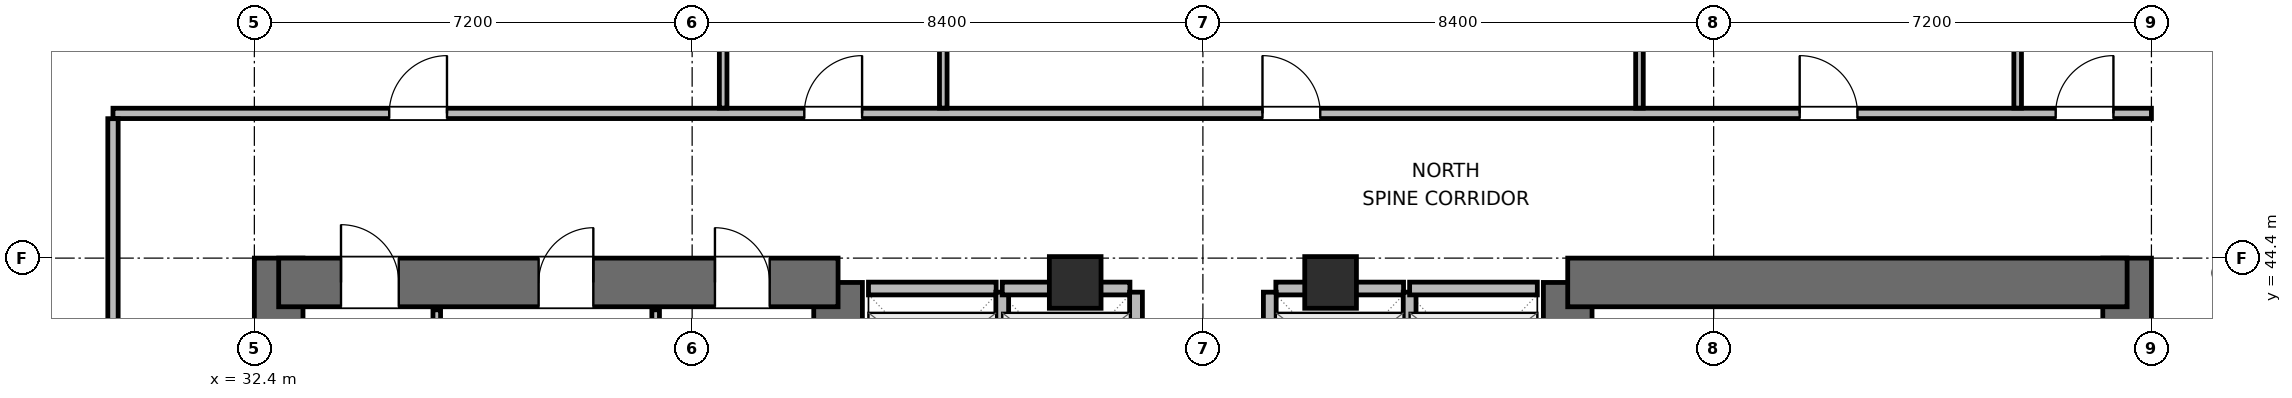
"""IFC4 building model, lengths in metres.
Left out: names, types, materials, properties, quantities, classifications, styles, units other than length and angle.
Written with IfcOpenShell. Run it as: python <this file> out.ifc"""

import sys

from ifc_helpers import new_model, si_unit, direction, frame, frame_2d, origin, origin_2d, place, context, subcontext, project, spatial, rectangle, extrude, element, fill, save


model = new_model("IFC4")
c1 = context("Model", 3, precision=1e-05, world=origin(), true_north=direction((0.0, 1.0)))
c2 = subcontext(c1, "Body", "Model", "MODEL_VIEW")
j1 = project(units=[si_unit("LENGTHUNIT", "METRE"), si_unit("PLANEANGLEUNIT", "RADIAN")], contexts=[c1])
p1 = place(None, origin())
s1 = spatial("IfcSite", under=j1, at=p1, CompositionType="ELEMENT")
p2 = place(p1, origin())
s2 = spatial("IfcBuilding", under=s1, at=p2, CompositionType="ELEMENT")
p3 = place(p2, frame((0.0, 0.0, 158.4)))
s3 = spatial("IfcBuildingStorey", under=s2, at=p3, CompositionType="ELEMENT", Elevation=158.4)
p4 = place(p3, frame((32.8, 27.6, 0.0), z_axis=(0.0, 0.0, 1.0), x_axis=(0.0, 1.0, 0.0)))
e1 = element("IfcWall", 1, at=p4, inside=s3, PredefinedType="SHEAR", context=c2, shape_type="SweptSolid", body=[
    extrude(rectangle(XDim=16.8, YDim=0.8, at=frame_2d((8.4, 0.0))), origin(), (0.0, 0.0, 1.0), 3.9),
])
p5 = place(p3, frame((42.0, 37.8, 0.0), z_axis=(0.0, 0.0, 1.0), x_axis=(0.0, 1.0, 0.0)))
e2 = element("IfcWall", 2, at=p5, inside=s3, PredefinedType="SHEAR", context=c2, shape_type="SweptSolid", body=[
    extrude(rectangle(XDim=6.2, YDim=0.8, at=frame_2d((3.1, 0.0))), origin(), (0.0, 0.0, 1.0), 3.9),
])
p6 = place(p3, frame((32.8, 44.0, 0.0), z_axis=(0.0, 0.0, 1.0), x_axis=(1.0, 0.0, 0.0)))
e3 = element("IfcWall", 3, at=p6, inside=s3, PredefinedType="SHEAR", context=c2, shape_type="SweptSolid", body=[
    extrude(rectangle(XDim=9.2, YDim=0.8, at=frame_2d((4.6, 0.0))), origin(), (0.0, 0.0, 1.0), 3.9),
])
p7 = place(p6, frame((1.025, 0.0, 0.0)))
e4 = element("IfcOpeningElement", 4, at=p7, cuts=e3, PredefinedType="OPENING", context=c2, shape_type="SweptSolid", body=[
    extrude(rectangle(XDim=0.95, YDim=2.04, at=frame_2d((0.475, 1.02))), frame((0.0, 0.41, 0.0), z_axis=(0.0, -1.0, 0.0), x_axis=(1.0, 0.0, 0.0)), (0.0, 0.0, 1.0), 0.82),
])
p8 = place(p6, frame((4.275, 0.0, 0.0)))
e5 = element("IfcOpeningElement", 5, at=p8, cuts=e3, PredefinedType="OPENING", context=c2, shape_type="SweptSolid", body=[
    extrude(rectangle(XDim=0.9, YDim=2.02, at=frame_2d((0.45, 1.01))), frame((0.0, 0.41, 0.0), z_axis=(0.0, -1.0, 0.0), x_axis=(1.0, 0.0, 0.0)), (0.0, 0.0, 1.0), 0.82),
])
p9 = place(p6, frame((7.175, 0.0, 0.0)))
e6 = element("IfcOpeningElement", 6, at=p9, cuts=e3, PredefinedType="OPENING", context=c2, shape_type="SweptSolid", body=[
    extrude(rectangle(XDim=0.9, YDim=2.02, at=frame_2d((0.45, 1.01))), frame((0.0, 0.41, 0.0), z_axis=(0.0, -1.0, 0.0), x_axis=(1.0, 0.0, 0.0)), (0.0, 0.0, 1.0), 0.82),
])
p10 = place(p3, frame((54.0, 38.0, 0.0), z_axis=(0.0, 0.0, 1.0), x_axis=(0.0, 1.0, 0.0)))
e7 = element("IfcWall", 7, at=p10, inside=s3, PredefinedType="SHEAR", context=c2, shape_type="SweptSolid", body=[
    extrude(rectangle(XDim=6.0, YDim=0.8, at=frame_2d((3.0, 0.0))), origin(), (0.0, 0.0, 1.0), 3.9),
])
p11 = place(p3, frame((63.2, 27.6, 0.0), z_axis=(0.0, 0.0, 1.0), x_axis=(0.0, 1.0, 0.0)))
e8 = element("IfcWall", 8, at=p11, inside=s3, PredefinedType="SHEAR", context=c2, shape_type="SweptSolid", body=[
    extrude(rectangle(XDim=16.8, YDim=0.8, at=frame_2d((8.4, 0.0))), origin(), (0.0, 0.0, 1.0), 3.9),
])
p12 = place(p3, frame((54.0, 44.0, 0.0), z_axis=(0.0, 0.0, 1.0), x_axis=(1.0, 0.0, 0.0)))
e9 = element("IfcWall", 9, at=p12, inside=s3, PredefinedType="SHEAR", context=c2, shape_type="SweptSolid", body=[
    extrude(rectangle(XDim=9.2, YDim=0.8, at=frame_2d((4.6, 0.0))), origin(), (0.0, 0.0, 1.0), 3.9),
])
for number, where, z_axis, x_axis in (
    (10, (45.9, 44.0, 0.0), (0.0, 0.0, 1.0), (1.0, 0.0, 0.0)),
    (11, (50.1, 44.0, 0.0), (0.0, 0.0, 1.0), (1.0, 0.0, 0.0)),
):
    element("IfcColumn", number, at=place(p3, frame(where, z_axis=z_axis, x_axis=x_axis)), inside=s3, PredefinedType="COLUMN", context=c2, shape_type="SweptSolid", body=[
        extrude(rectangle(XDim=0.85, YDim=0.85, at=origin_2d()), origin(), (0.0, 0.0, 1.0), 3.9),
    ])
for number, where, z_axis, x_axis in (
    (12, (35.4, 41.095, 0.0), (0.0, 0.0, 1.0), (0.0, 1.0, 0.0)),
    (13, (39.0, 41.095, 0.0), (0.0, 0.0, 1.0), (0.0, 1.0, 0.0)),
):
    element("IfcWall", number, at=place(p3, frame(where, z_axis=z_axis, x_axis=x_axis)), inside=s3, PredefinedType="PARTITIONING", context=c2, shape_type="SweptSolid", body=[
        extrude(rectangle(XDim=2.455, YDim=0.125, at=frame_2d((1.228, 0.0))), origin(), (0.0, 0.0, 1.0), 3.68),
    ])
p13 = place(p3, frame((42.5, 43.9, 0.0), z_axis=(0.0, 0.0, 1.0), x_axis=(1.0, 0.0, 0.0)))
e14 = element("IfcWall", 14, at=p13, inside=s3, PredefinedType="PARTITIONING", context=c2, shape_type="SweptSolid", body=[
    extrude(rectangle(XDim=2.1, YDim=0.21, at=frame_2d((1.05, 0.0))), origin(), (0.0, 0.0, 1.0), 2.565),
])
p14 = place(p3, frame((44.7, 41.56, 0.0), z_axis=(0.0, 0.0, 1.0), x_axis=(0.0, 1.0, 0.0)))
e15 = element("IfcWall", 15, at=p14, inside=s3, PredefinedType="PARTITIONING", context=c2, shape_type="SweptSolid", body=[
    extrude(rectangle(XDim=2.28, YDim=0.21, at=frame_2d((1.14, 0.0))), origin(), (0.0, 0.0, 1.0), 3.68),
])
p15 = place(p3, frame((44.7, 43.9, 0.0), z_axis=(0.0, 0.0, 1.0), x_axis=(1.0, 0.0, 0.0)))
e16 = element("IfcWall", 16, at=p15, inside=s3, PredefinedType="PARTITIONING", context=c2, shape_type="SweptSolid", body=[
    extrude(rectangle(XDim=2.1, YDim=0.21, at=frame_2d((1.05, 0.0))), origin(), (0.0, 0.0, 1.0), 2.565),
])
p16 = place(p3, frame((46.9, 41.56, 0.0), z_axis=(0.0, 0.0, 1.0), x_axis=(0.0, 1.0, 0.0)))
e17 = element("IfcWall", 17, at=p16, inside=s3, PredefinedType="PARTITIONING", context=c2, shape_type="SweptSolid", body=[
    extrude(rectangle(XDim=2.28, YDim=0.21, at=frame_2d((1.14, 0.0))), origin(), (0.0, 0.0, 1.0), 3.68),
])
p17 = place(p3, frame((49.2, 43.9, 0.0), z_axis=(0.0, 0.0, 1.0), x_axis=(1.0, 0.0, 0.0)))
e18 = element("IfcWall", 18, at=p17, inside=s3, PredefinedType="PARTITIONING", context=c2, shape_type="SweptSolid", body=[
    extrude(rectangle(XDim=2.1, YDim=0.21, at=frame_2d((1.05, 0.0))), origin(), (0.0, 0.0, 1.0), 2.565),
])
for number, where, z_axis, x_axis in (
    (19, (49.1, 41.56, 0.0), (0.0, 0.0, 1.0), (0.0, 1.0, 0.0)),
    (20, (51.4, 41.56, 0.0), (0.0, 0.0, 1.0), (0.0, 1.0, 0.0)),
):
    element("IfcWall", number, at=place(p3, frame(where, z_axis=z_axis, x_axis=x_axis)), inside=s3, PredefinedType="PARTITIONING", context=c2, shape_type="SweptSolid", body=[
        extrude(rectangle(XDim=2.28, YDim=0.21, at=frame_2d((1.14, 0.0))), origin(), (0.0, 0.0, 1.0), 3.68),
    ])
p18 = place(p3, frame((51.4, 43.9, 0.0), z_axis=(0.0, 0.0, 1.0), x_axis=(1.0, 0.0, 0.0)))
e21 = element("IfcWall", 21, at=p18, inside=s3, PredefinedType="PARTITIONING", context=c2, shape_type="SweptSolid", body=[
    extrude(rectangle(XDim=2.1, YDim=0.21, at=frame_2d((1.05, 0.0))), origin(), (0.0, 0.0, 1.0), 2.565),
])
p19 = place(p3, frame((30.075, 46.78, 0.0), z_axis=(0.0, 0.0, 1.0), x_axis=(1.0, 0.0, 0.0)))
e22 = element("IfcWall", 22, at=p19, inside=s3, PredefinedType="PARTITIONING", context=c2, shape_type="SweptSolid", body=[
    extrude(rectangle(XDim=33.525, YDim=0.17, at=frame_2d((16.763, 0.0))), origin(), (0.0, 0.0, 1.0), 3.68),
])
p20 = place(p19, frame((4.543, 0.0, 0.0)))
e23 = element("IfcOpeningElement", 23, at=p20, cuts=e22, PredefinedType="OPENING", context=c2, shape_type="SweptSolid", body=[
    extrude(rectangle(XDim=0.95, YDim=2.04, at=frame_2d((0.475, 1.02))), frame((0.0, 0.095, 0.0), z_axis=(0.0, -1.0, 0.0), x_axis=(1.0, 0.0, 0.0)), (0.0, 0.0, 1.0), 0.19),
])
p21 = place(p19, frame((11.37, 0.0, 0.0)))
e24 = element("IfcOpeningElement", 24, at=p21, cuts=e22, PredefinedType="OPENING", context=c2, shape_type="SweptSolid", body=[
    extrude(rectangle(XDim=0.95, YDim=2.04, at=frame_2d((0.475, 1.02))), frame((0.0, 0.095, 0.0), z_axis=(0.0, -1.0, 0.0), x_axis=(1.0, 0.0, 0.0)), (0.0, 0.0, 1.0), 0.19),
])
p22 = place(p19, frame((18.905, 0.0, 0.0)))
e25 = element("IfcOpeningElement", 25, at=p22, cuts=e22, PredefinedType="OPENING", context=c2, shape_type="SweptSolid", body=[
    extrude(rectangle(XDim=0.95, YDim=2.04, at=frame_2d((0.475, 1.02))), frame((0.0, 0.095, 0.0), z_axis=(0.0, -1.0, 0.0), x_axis=(1.0, 0.0, 0.0)), (0.0, 0.0, 1.0), 0.19),
])
p23 = place(p19, frame((27.74, 0.0, 0.0)))
e26 = element("IfcOpeningElement", 26, at=p23, cuts=e22, PredefinedType="OPENING", context=c2, shape_type="SweptSolid", body=[
    extrude(rectangle(XDim=0.95, YDim=2.04, at=frame_2d((0.475, 1.02))), frame((0.0, 0.095, 0.0), z_axis=(0.0, -1.0, 0.0), x_axis=(1.0, 0.0, 0.0)), (0.0, 0.0, 1.0), 0.19),
])
p24 = place(p19, frame((31.95, 0.0, 0.0)))
e27 = element("IfcOpeningElement", 27, at=p24, cuts=e22, PredefinedType="OPENING", context=c2, shape_type="SweptSolid", body=[
    extrude(rectangle(XDim=0.95, YDim=2.04, at=frame_2d((0.475, 1.02))), frame((0.0, 0.095, 0.0), z_axis=(0.0, -1.0, 0.0), x_axis=(1.0, 0.0, 0.0)), (0.0, 0.0, 1.0), 0.19),
])
p25 = place(p3, frame((30.075, 37.1, 0.0), z_axis=(0.0, 0.0, 1.0), x_axis=(0.0, 1.0, 0.0)))
e28 = element("IfcWall", 28, at=p25, inside=s3, PredefinedType="PARTITIONING", context=c2, shape_type="SweptSolid", body=[
    extrude(rectangle(XDim=9.593, YDim=0.17, at=frame_2d((4.796, 0.0))), origin(), (0.0, 0.0, 1.0), 3.68),
])
p26 = place(p25, frame((4.365, 0.0, 0.0)))
e29 = element("IfcOpeningElement", 29, at=p26, cuts=e28, PredefinedType="OPENING", context=c2, shape_type="SweptSolid", body=[
    extrude(rectangle(XDim=0.95, YDim=2.04, at=frame_2d((0.475, 1.02))), frame((0.0, 0.095, 0.0), z_axis=(0.0, -1.0, 0.0), x_axis=(1.0, 0.0, 0.0)), (0.0, 0.0, 1.0), 0.19),
])
p27 = place(p3, frame((40.11, 46.867, 0.0), z_axis=(0.0, 0.0, 1.0), x_axis=(0.0, 1.0, 0.0)))
e30 = element("IfcWall", 30, at=p27, inside=s3, PredefinedType="PARTITIONING", context=c2, shape_type="SweptSolid", body=[
    extrude(rectangle(XDim=15.298, YDim=0.125, at=frame_2d((7.649, 0.0))), origin(), (0.0, 0.0, 1.0), 3.043),
])
p28 = place(p3, frame((43.73, 46.867, 0.0), z_axis=(0.0, 0.0, 1.0), x_axis=(0.0, 1.0, 0.0)))
e31 = element("IfcWall", 31, at=p28, inside=s3, PredefinedType="PARTITIONING", context=c2, shape_type="SweptSolid", body=[
    extrude(rectangle(XDim=13.766, YDim=0.125, at=frame_2d((6.883, 0.0))), origin(), (0.0, 0.0, 1.0), 3.043),
])
p29 = place(p3, frame((55.18, 46.867, 0.0), z_axis=(0.0, 0.0, 1.0), x_axis=(0.0, 1.0, 0.0)))
e32 = element("IfcWall", 32, at=p29, inside=s3, PredefinedType="PARTITIONING", context=c2, shape_type="SweptSolid", body=[
    extrude(rectangle(XDim=15.258, YDim=0.125, at=frame_2d((7.629, 0.0))), origin(), (0.0, 0.0, 1.0), 3.043),
])
p30 = place(p3, frame((61.4, 46.867, 0.0), z_axis=(0.0, 0.0, 1.0), x_axis=(0.0, 1.0, 0.0)))
e33 = element("IfcWall", 33, at=p30, inside=s3, PredefinedType="PARTITIONING", context=c2, shape_type="SweptSolid", body=[
    extrude(rectangle(XDim=15.258, YDim=0.125, at=frame_2d((7.629, 0.0))), origin(), (0.0, 0.0, 1.0), 3.68),
])
p31 = place(p7, origin())
e34 = element("IfcDoor", 34, at=p31, inside=s3, OperationType="SINGLE_SWING_LEFT", PredefinedType="DOOR", context=c2, shape_type="SweptSolid", body=[
    extrude(rectangle(XDim=0.95, YDim=2.04, at=frame_2d((0.475, 1.02))), frame((0.0, 0.025, 0.0), z_axis=(0.0, -1.0, 0.0), x_axis=(1.0, 0.0, 0.0)), (0.0, 0.0, 1.0), 0.05),
])
fill(e4, e34)
p32 = place(p8, origin())
e35 = element("IfcDoor", 35, at=p32, inside=s3, OperationType="SINGLE_SWING_RIGHT", PredefinedType="DOOR", context=c2, shape_type="SweptSolid", body=[
    extrude(rectangle(XDim=0.9, YDim=2.02, at=frame_2d((0.45, 1.01))), frame((0.0, 0.025, 0.0), z_axis=(0.0, -1.0, 0.0), x_axis=(1.0, 0.0, 0.0)), (0.0, 0.0, 1.0), 0.05),
])
fill(e5, e35)
p33 = place(p9, origin())
e36 = element("IfcDoor", 36, at=p33, inside=s3, OperationType="SINGLE_SWING_LEFT", PredefinedType="DOOR", context=c2, shape_type="SweptSolid", body=[
    extrude(rectangle(XDim=0.9, YDim=2.02, at=frame_2d((0.45, 1.01))), frame((0.0, 0.025, 0.0), z_axis=(0.0, -1.0, 0.0), x_axis=(1.0, 0.0, 0.0)), (0.0, 0.0, 1.0), 0.05),
])
fill(e6, e36)
p34 = place(p20, origin())
e37 = element("IfcDoor", 37, at=p34, inside=s3, OperationType="SINGLE_SWING_RIGHT", PredefinedType="DOOR", context=c2, shape_type="SweptSolid", body=[
    extrude(rectangle(XDim=0.95, YDim=2.04, at=frame_2d((0.475, 1.02))), frame((0.0, 0.025, 0.0), z_axis=(0.0, -1.0, 0.0), x_axis=(1.0, 0.0, 0.0)), (0.0, 0.0, 1.0), 0.05),
])
fill(e23, e37)
p35 = place(p21, origin())
e38 = element("IfcDoor", 38, at=p35, inside=s3, OperationType="SINGLE_SWING_RIGHT", PredefinedType="DOOR", context=c2, shape_type="SweptSolid", body=[
    extrude(rectangle(XDim=0.95, YDim=2.04, at=frame_2d((0.475, 1.02))), frame((0.0, 0.025, 0.0), z_axis=(0.0, -1.0, 0.0), x_axis=(1.0, 0.0, 0.0)), (0.0, 0.0, 1.0), 0.05),
])
fill(e24, e38)
p36 = place(p22, origin())
e39 = element("IfcDoor", 39, at=p36, inside=s3, OperationType="SINGLE_SWING_LEFT", PredefinedType="DOOR", context=c2, shape_type="SweptSolid", body=[
    extrude(rectangle(XDim=0.95, YDim=2.04, at=frame_2d((0.475, 1.02))), frame((0.0, 0.025, 0.0), z_axis=(0.0, -1.0, 0.0), x_axis=(1.0, 0.0, 0.0)), (0.0, 0.0, 1.0), 0.05),
])
fill(e25, e39)
p37 = place(p23, origin())
e40 = element("IfcDoor", 40, at=p37, inside=s3, OperationType="SINGLE_SWING_LEFT", PredefinedType="DOOR", context=c2, shape_type="SweptSolid", body=[
    extrude(rectangle(XDim=0.95, YDim=2.04, at=frame_2d((0.475, 1.02))), frame((0.0, 0.025, 0.0), z_axis=(0.0, -1.0, 0.0), x_axis=(1.0, 0.0, 0.0)), (0.0, 0.0, 1.0), 0.05),
])
fill(e26, e40)
p38 = place(p24, origin())
e41 = element("IfcDoor", 41, at=p38, inside=s3, OperationType="SINGLE_SWING_RIGHT", PredefinedType="DOOR", context=c2, shape_type="SweptSolid", body=[
    extrude(rectangle(XDim=0.95, YDim=2.04, at=frame_2d((0.475, 1.02))), frame((0.0, 0.025, 0.0), z_axis=(0.0, -1.0, 0.0), x_axis=(1.0, 0.0, 0.0)), (0.0, 0.0, 1.0), 0.05),
])
fill(e27, e41)
save(model, sys.argv[1])
